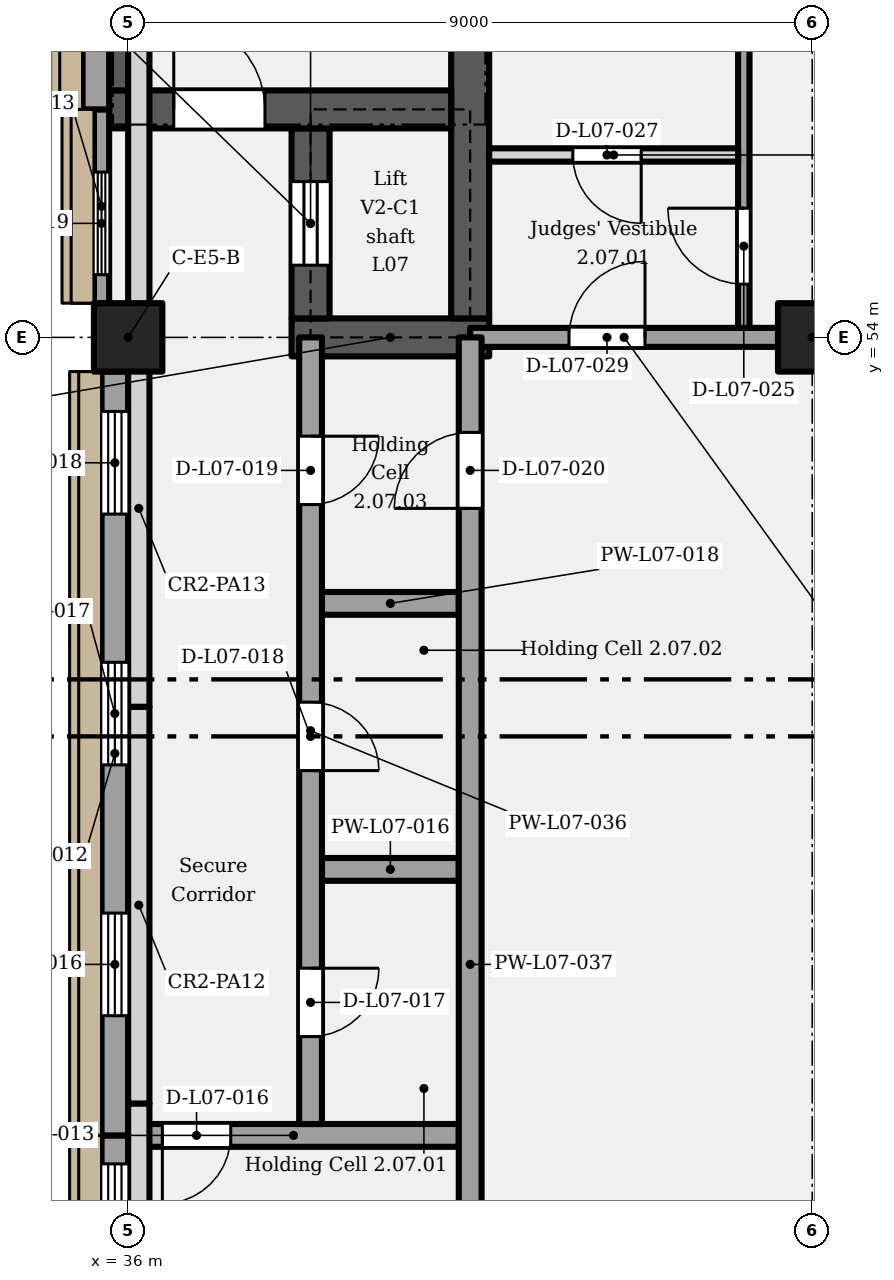
"""IFC4 building model, lengths in metres.
Left out: names, types, materials, properties, quantities, classifications, styles, units other than length and angle.
Written with IfcOpenShell. Run it as: python <this file> out.ifc"""

import sys

from ifc_helpers import new_model, si_unit, direction, frame, frame_2d, origin, origin_2d, place, context, subcontext, project, spatial, rectangle, extrude, element, fill, save


model = new_model("IFC4")
c1 = context("Model", 3, precision=1e-05, world=origin(), true_north=direction((0.0, 1.0)))
c2 = subcontext(c1, "Body", "Model", "MODEL_VIEW")
j1 = project(units=[si_unit("LENGTHUNIT", "METRE"), si_unit("PLANEANGLEUNIT", "RADIAN")], contexts=[c1])
p1 = place(None, origin())
s1 = spatial("IfcSite", under=j1, at=p1, CompositionType="ELEMENT")
p2 = place(p1, origin())
s2 = spatial("IfcBuilding", under=s1, at=p2, CompositionType="ELEMENT")
p3 = place(p2, frame((0.0, 0.0, 39.0)))
s3 = spatial("IfcBuildingStorey", under=s2, at=p3, CompositionType="ELEMENT", Elevation=39.0)
for number, where, z_axis, x_axis in (
    (1, (36.0, 54.0, 0.0), (0.0, 0.0, 1.0), (1.0, 0.0, 0.0)),
    (2, (45.0, 54.0, 0.0), (0.0, 0.0, 1.0), (1.0, 0.0, 0.0)),
):
    element("IfcColumn", number, at=place(p3, frame(where, z_axis=z_axis, x_axis=x_axis)), inside=s3, PredefinedType="COLUMN", context=c2, shape_type="SweptSolid", body=[
        extrude(rectangle(XDim=0.9, YDim=0.9, at=origin_2d()), origin(), (0.0, 0.0, 1.0), 5.4),
    ])
p4 = place(p3, frame((38.15, 54.0, 0.0), z_axis=(0.0, 0.0, 1.0), x_axis=(1.0, 0.0, 0.0)))
e3 = element("IfcWall", 3, at=p4, inside=s3, PredefinedType="SHEAR", context=c2, shape_type="SweptSolid", body=[
    extrude(rectangle(XDim=2.6, YDim=0.5, at=frame_2d((1.3, 0.0))), origin(), (0.0, 0.0, 1.0), 5.15),
])
p5 = place(p3, frame((38.4, 54.25, 0.0), z_axis=(0.0, 0.0, 1.0), x_axis=(0.0, 1.0, 0.0)))
e4 = element("IfcWall", 4, at=p5, inside=s3, PredefinedType="SHEAR", context=c2, shape_type="SweptSolid", body=[
    extrude(rectangle(XDim=2.5, YDim=0.5, at=frame_2d((1.25, 0.0))), origin(), (0.0, 0.0, 1.0), 5.15),
])
p6 = place(p5, frame((0.7, 0.0, 0.0)))
e5 = element("IfcOpeningElement", 5, at=p6, cuts=e4, PredefinedType="OPENING", context=c2, shape_type="SweptSolid", body=[
    extrude(rectangle(XDim=1.1, YDim=2.1, at=frame_2d((0.55, 1.05))), frame((0.0, 0.26, 0.0), z_axis=(0.0, -1.0, 0.0), x_axis=(1.0, 0.0, 0.0)), (0.0, 0.0, 1.0), 0.52),
])
p7 = place(p3, frame((40.5, 54.25, 0.0), z_axis=(0.0, 0.0, 1.0), x_axis=(0.0, 1.0, 0.0)))
e6 = element("IfcWall", 6, at=p7, inside=s3, PredefinedType="SHEAR", context=c2, shape_type="SweptSolid", body=[
    extrude(rectangle(XDim=11.5, YDim=0.5, at=frame_2d((5.75, 0.0))), origin(), (0.0, 0.0, 1.0), 5.15),
])
p8 = place(p3, frame((35.75, 57.0, 0.0), z_axis=(0.0, 0.0, 1.0), x_axis=(1.0, 0.0, 0.0)))
e7 = element("IfcWall", 7, at=p8, inside=s3, PredefinedType="SHEAR", context=c2, shape_type="SweptSolid", body=[
    extrude(rectangle(XDim=4.5, YDim=0.5, at=frame_2d((2.25, 0.0))), origin(), (0.0, 0.0, 1.0), 5.15),
])
p9 = place(p8, frame((0.85, 0.0, 0.0)))
e8 = element("IfcOpeningElement", 8, at=p9, cuts=e7, PredefinedType="OPENING", context=c2, shape_type="SweptSolid", body=[
    extrude(rectangle(XDim=1.2, YDim=2.1, at=frame_2d((0.6, 1.05))), frame((0.0, 0.26, 0.0), z_axis=(0.0, -1.0, 0.0), x_axis=(1.0, 0.0, 0.0)), (0.0, 0.0, 1.0), 0.52),
])
p10 = place(p3, frame((36.0, 57.25, 0.0), z_axis=(0.0, 0.0, 1.0), x_axis=(0.0, 1.0, 0.0)))
e9 = element("IfcWall", 9, at=p10, inside=s3, PredefinedType="SHEAR", context=c2, shape_type="SweptSolid", body=[
    extrude(rectangle(XDim=8.3, YDim=0.5, at=frame_2d((4.15, 0.0))), origin(), (0.0, 0.0, 1.0), 5.15),
])
p11 = place(p3, frame((35.825, 37.95, 0.0), z_axis=(0.0, 0.0, 1.0), x_axis=(0.0, 1.0, 0.0)))
e10 = element("IfcWall", 10, at=p11, inside=s3, PredefinedType="SOLIDWALL", context=c2, shape_type="SweptSolid", body=[
    extrude(rectangle(XDim=5.55, YDim=0.35, at=frame_2d((2.775, 0.0))), origin(), (0.0, 0.0, 1.0), 5.15),
])
p12 = place(p11, frame((0.525, 0.0, 1.2)))
e11 = element("IfcOpeningElement", 11, at=p12, cuts=e10, PredefinedType="OPENING", context=c2, shape_type="SweptSolid", body=[
    extrude(rectangle(XDim=1.35, YDim=3.0, at=frame_2d((0.675, 1.5))), frame((0.0, 0.185, 0.0), z_axis=(0.0, -1.0, 0.0), x_axis=(1.0, 0.0, 0.0)), (0.0, 0.0, 1.0), 0.37),
])
p13 = place(p11, frame((3.825, 0.0, 1.2)))
e12 = element("IfcOpeningElement", 12, at=p13, cuts=e10, PredefinedType="OPENING", context=c2, shape_type="SweptSolid", body=[
    extrude(rectangle(XDim=1.35, YDim=3.0, at=frame_2d((0.675, 1.5))), frame((0.0, 0.185, 0.0), z_axis=(0.0, -1.0, 0.0), x_axis=(1.0, 0.0, 0.0)), (0.0, 0.0, 1.0), 0.37),
])
p14 = place(p3, frame((35.825, 43.5, 0.0), z_axis=(0.0, 0.0, 1.0), x_axis=(0.0, 1.0, 0.0)))
e13 = element("IfcWall", 13, at=p14, inside=s3, PredefinedType="SOLIDWALL", context=c2, shape_type="SweptSolid", body=[
    extrude(rectangle(XDim=10.05, YDim=0.35, at=frame_2d((5.025, 0.0))), origin(), (0.0, 0.0, 1.0), 5.15),
])
p15 = place(p14, frame((1.575, 0.0, 1.2)))
e14 = element("IfcOpeningElement", 14, at=p15, cuts=e13, PredefinedType="OPENING", context=c2, shape_type="SweptSolid", body=[
    extrude(rectangle(XDim=1.35, YDim=3.0, at=frame_2d((0.675, 1.5))), frame((0.0, 0.185, 0.0), z_axis=(0.0, -1.0, 0.0), x_axis=(1.0, 0.0, 0.0)), (0.0, 0.0, 1.0), 0.37),
])
p16 = place(p14, frame((4.875, 0.0, 1.2)))
e15 = element("IfcOpeningElement", 15, at=p16, cuts=e13, PredefinedType="OPENING", context=c2, shape_type="SweptSolid", body=[
    extrude(rectangle(XDim=1.35, YDim=3.0, at=frame_2d((0.675, 1.5))), frame((0.0, 0.185, 0.0), z_axis=(0.0, -1.0, 0.0), x_axis=(1.0, 0.0, 0.0)), (0.0, 0.0, 1.0), 0.37),
])
p17 = place(p14, frame((8.175, 0.0, 1.2)))
e16 = element("IfcOpeningElement", 16, at=p17, cuts=e13, PredefinedType="OPENING", context=c2, shape_type="SweptSolid", body=[
    extrude(rectangle(XDim=1.35, YDim=3.0, at=frame_2d((0.675, 1.5))), frame((0.0, 0.185, 0.0), z_axis=(0.0, -1.0, 0.0), x_axis=(1.0, 0.0, 0.0)), (0.0, 0.0, 1.0), 0.37),
])
p18 = place(p3, frame((35.65, 54.45, 0.0), z_axis=(0.0, 0.0, 1.0), x_axis=(0.0, 1.0, 0.0)))
e17 = element("IfcWall", 17, at=p18, inside=s3, PredefinedType="SOLIDWALL", context=c2, shape_type="SweptSolid", body=[
    extrude(rectangle(XDim=2.55, YDim=0.2, at=frame_2d((1.275, 0.0))), origin(), (0.0, 0.0, 1.0), 5.15),
])
p19 = place(p18, frame((0.375, 0.0, 1.2)))
e18 = element("IfcOpeningElement", 18, at=p19, cuts=e17, PredefinedType="OPENING", context=c2, shape_type="SweptSolid", body=[
    extrude(rectangle(XDim=1.35, YDim=3.0, at=frame_2d((0.675, 1.5))), frame((0.0, 0.11, 0.0), z_axis=(0.0, -1.0, 0.0), x_axis=(1.0, 0.0, 0.0)), (0.0, 0.0, 1.0), 0.22),
])
p20 = place(p3, frame((35.575, 57.0, 0.0), z_axis=(0.0, 0.0, 1.0), x_axis=(0.0, 1.0, 0.0)))
e19 = element("IfcWall", 19, at=p20, inside=s3, PredefinedType="SOLIDWALL", context=c2, shape_type="SweptSolid", body=[
    extrude(rectangle(XDim=8.55, YDim=0.35, at=frame_2d((4.275, 0.0))), origin(), (0.0, 0.0, 1.0), 5.15),
])
p21 = place(p3, frame((36.14, 38.7, 5.4), z_axis=(0.0, 0.0, 1.0), x_axis=(0.0, 1.0, 0.0)))
e20 = element("IfcWall", 20, at=p21, inside=s3, PredefinedType="PARAPET", context=c2, shape_type="SweptSolid", body=[
    extrude(rectangle(XDim=5.22, YDim=0.28, at=frame_2d((2.61, 0.0))), origin(), (0.0, 0.0, 1.0), 1.2),
])
p22 = place(p3, frame((36.14, 43.92, 5.4), z_axis=(0.0, 0.0, 1.0), x_axis=(0.0, 1.0, 0.0)))
e21 = element("IfcWall", 21, at=p22, inside=s3, PredefinedType="PARAPET", context=c2, shape_type="SweptSolid", body=[
    extrude(rectangle(XDim=5.22, YDim=0.28, at=frame_2d((2.61, 0.0))), origin(), (0.0, 0.0, 1.0), 1.4),
])
p23 = place(p3, frame((36.14, 49.14, 5.4), z_axis=(0.0, 0.0, 1.0), x_axis=(0.0, 1.0, 0.0)))
e22 = element("IfcWall", 22, at=p23, inside=s3, PredefinedType="PARAPET", context=c2, shape_type="SweptSolid", body=[
    extrude(rectangle(XDim=5.22, YDim=0.28, at=frame_2d((2.61, 0.0))), origin(), (0.0, 0.0, 1.0), 1.6),
])
p24 = place(p3, frame((36.14, 54.36, 5.4), z_axis=(0.0, 0.0, 1.0), x_axis=(0.0, 1.0, 0.0)))
e23 = element("IfcWall", 23, at=p24, inside=s3, PredefinedType="PARAPET", context=c2, shape_type="SweptSolid", body=[
    extrude(rectangle(XDim=5.22, YDim=0.28, at=frame_2d((2.61, 0.0))), origin(), (0.0, 0.0, 1.0), 1.4),
])
p25 = place(p3, frame((36.0, 43.5, 0.0), z_axis=(0.0, 0.0, 1.0), x_axis=(1.0, 0.0, 0.0)))
e24 = element("IfcWall", 24, at=p25, inside=s3, PredefinedType="PARTITIONING", context=c2, shape_type="SweptSolid", body=[
    extrude(rectangle(XDim=4.35, YDim=0.3, at=frame_2d((2.175, 0.0))), origin(), (0.0, 0.0, 1.0), 5.15),
])
p26 = place(p25, frame((1.35, 0.0, 0.0), z_axis=(0.0, 0.0, 1.0), x_axis=(-1.0, 0.0, 0.0)))
e25 = element("IfcOpeningElement", 25, at=p26, cuts=e24, PredefinedType="OPENING", context=c2, shape_type="SweptSolid", body=[
    extrude(rectangle(XDim=0.9, YDim=2.1, at=frame_2d((0.45, 1.05))), frame((0.0, 0.16, 0.0), z_axis=(0.0, -1.0, 0.0), x_axis=(1.0, 0.0, 0.0)), (0.0, 0.0, 1.0), 0.32),
])
for number, where, z_axis, x_axis in (
    (26, (38.55, 47.0, 0.0), (0.0, 0.0, 1.0), (1.0, 0.0, 0.0)),
    (27, (38.55, 50.5, 0.0), (0.0, 0.0, 1.0), (1.0, 0.0, 0.0)),
):
    element("IfcWall", number, at=place(p3, frame(where, z_axis=z_axis, x_axis=x_axis)), inside=s3, PredefinedType="PARTITIONING", context=c2, shape_type="SweptSolid", body=[
        extrude(rectangle(XDim=1.8, YDim=0.3, at=frame_2d((0.9, 0.0))), origin(), (0.0, 0.0, 1.0), 5.15),
    ])
p27 = place(p3, frame((40.5, 54.0, 0.0), z_axis=(0.0, 0.0, 1.0), x_axis=(1.0, 0.0, 0.0)))
e28 = element("IfcWall", 28, at=p27, inside=s3, PredefinedType="PARTITIONING", context=c2, shape_type="SweptSolid", body=[
    extrude(rectangle(XDim=4.05, YDim=0.25, at=frame_2d((2.025, 0.0))), origin(), (0.0, 0.0, 1.0), 4.4),
])
p28 = place(p27, frame((1.3, 0.0, 0.0)))
e29 = element("IfcOpeningElement", 29, at=p28, cuts=e28, PredefinedType="OPENING", context=c2, shape_type="SweptSolid", body=[
    extrude(rectangle(XDim=1.0, YDim=2.1, at=frame_2d((0.5, 1.05))), frame((0.0, 0.135, 0.0), z_axis=(0.0, -1.0, 0.0), x_axis=(1.0, 0.0, 0.0)), (0.0, 0.0, 1.0), 0.27),
])
p29 = place(p3, frame((40.75, 56.4, 0.0), z_axis=(0.0, 0.0, 1.0), x_axis=(1.0, 0.0, 0.0)))
e30 = element("IfcWall", 30, at=p29, inside=s3, PredefinedType="PARTITIONING", context=c2, shape_type="SweptSolid", body=[
    extrude(rectangle(XDim=3.275, YDim=0.175, at=frame_2d((1.637, 0.0))), origin(), (0.0, 0.0, 1.0), 5.15),
])
p30 = place(p29, frame((2.0, 0.0, 0.0), z_axis=(0.0, 0.0, 1.0), x_axis=(-1.0, 0.0, 0.0)))
e31 = element("IfcOpeningElement", 31, at=p30, cuts=e30, PredefinedType="OPENING", context=c2, shape_type="SweptSolid", body=[
    extrude(rectangle(XDim=0.9, YDim=2.1, at=frame_2d((0.45, 1.05))), frame((0.0, 0.097, 0.0), z_axis=(0.0, -1.0, 0.0), x_axis=(1.0, 0.0, 0.0)), (0.0, 0.0, 1.0), 0.195),
])
p31 = place(p3, frame((38.4, 43.65, 0.0), z_axis=(0.0, 0.0, 1.0), x_axis=(0.0, 1.0, 0.0)))
e32 = element("IfcWall", 32, at=p31, inside=s3, PredefinedType="PARTITIONING", context=c2, shape_type="SweptSolid", body=[
    extrude(rectangle(XDim=10.35, YDim=0.3, at=frame_2d((5.175, 0.0))), origin(), (0.0, 0.0, 1.0), 5.15),
])
p32 = place(p31, frame((2.05, 0.0, 0.0), z_axis=(0.0, 0.0, 1.0), x_axis=(-1.0, 0.0, 0.0)))
e33 = element("IfcOpeningElement", 33, at=p32, cuts=e32, PredefinedType="OPENING", context=c2, shape_type="SweptSolid", body=[
    extrude(rectangle(XDim=0.9, YDim=2.0, at=frame_2d((0.45, 1.0))), frame((0.0, 0.16, 0.0), z_axis=(0.0, -1.0, 0.0), x_axis=(1.0, 0.0, 0.0)), (0.0, 0.0, 1.0), 0.32),
])
p33 = place(p31, frame((5.55, 0.0, 0.0), z_axis=(0.0, 0.0, 1.0), x_axis=(-1.0, 0.0, 0.0)))
e34 = element("IfcOpeningElement", 34, at=p33, cuts=e32, PredefinedType="OPENING", context=c2, shape_type="SweptSolid", body=[
    extrude(rectangle(XDim=0.9, YDim=2.0, at=frame_2d((0.45, 1.0))), frame((0.0, 0.16, 0.0), z_axis=(0.0, -1.0, 0.0), x_axis=(1.0, 0.0, 0.0)), (0.0, 0.0, 1.0), 0.32),
])
p34 = place(p31, frame((9.05, 0.0, 0.0), z_axis=(0.0, 0.0, 1.0), x_axis=(-1.0, 0.0, 0.0)))
e35 = element("IfcOpeningElement", 35, at=p34, cuts=e32, PredefinedType="OPENING", context=c2, shape_type="SweptSolid", body=[
    extrude(rectangle(XDim=0.9, YDim=2.0, at=frame_2d((0.45, 1.0))), frame((0.0, 0.16, 0.0), z_axis=(0.0, -1.0, 0.0), x_axis=(1.0, 0.0, 0.0)), (0.0, 0.0, 1.0), 0.32),
])
p35 = place(p3, frame((40.5, 37.5, 0.0), z_axis=(0.0, 0.0, 1.0), x_axis=(0.0, 1.0, 0.0)))
e36 = element("IfcWall", 36, at=p35, inside=s3, PredefinedType="PARTITIONING", context=c2, shape_type="SweptSolid", body=[
    extrude(rectangle(XDim=16.5, YDim=0.3, at=frame_2d((8.25, 0.0))), origin(), (0.0, 0.0, 1.0), 5.15),
])
p36 = place(p35, frame((14.25, 0.0, 0.0)))
e37 = element("IfcOpeningElement", 37, at=p36, cuts=e36, PredefinedType="OPENING", context=c2, shape_type="SweptSolid", body=[
    extrude(rectangle(XDim=1.0, YDim=2.0, at=frame_2d((0.5, 1.0))), frame((0.0, 0.16, 0.0), z_axis=(0.0, -1.0, 0.0), x_axis=(1.0, 0.0, 0.0)), (0.0, 0.0, 1.0), 0.32),
])
p37 = place(p3, frame((44.1, 54.125, 0.0), z_axis=(0.0, 0.0, 1.0), x_axis=(0.0, 1.0, 0.0)))
e38 = element("IfcWall", 38, at=p37, inside=s3, PredefinedType="PARTITIONING", context=c2, shape_type="SweptSolid", body=[
    extrude(rectangle(XDim=8.8, YDim=0.15, at=frame_2d((4.4, 0.0))), origin(), (0.0, 0.0, 1.0), 5.15),
])
p38 = place(p37, frame((0.575, 0.0, 0.0)))
e39 = element("IfcOpeningElement", 39, at=p38, cuts=e38, PredefinedType="OPENING", context=c2, shape_type="SweptSolid", body=[
    extrude(rectangle(XDim=1.0, YDim=2.1, at=frame_2d((0.5, 1.05))), frame((0.0, 0.085, 0.0), z_axis=(0.0, -1.0, 0.0), x_axis=(1.0, 0.0, 0.0)), (0.0, 0.0, 1.0), 0.17),
])
p39 = place(p37, frame((5.425, 0.0, 0.0)))
e40 = element("IfcOpeningElement", 40, at=p39, cuts=e38, PredefinedType="OPENING", context=c2, shape_type="SweptSolid", body=[
    extrude(rectangle(XDim=0.9, YDim=2.1, at=frame_2d((0.45, 1.05))), frame((0.0, 0.085, 0.0), z_axis=(0.0, -1.0, 0.0), x_axis=(1.0, 0.0, 0.0)), (0.0, 0.0, 1.0), 0.17),
])
p40 = place(p13, origin())
e41 = element("IfcWindow", 41, at=p40, inside=s3, PartitioningType="SINGLE_PANEL", PredefinedType="WINDOW", context=c2, shape_type="SweptSolid", body=[
    extrude(rectangle(XDim=1.35, YDim=3.0, at=frame_2d((0.675, 1.5))), frame((0.0, 0.03, 0.0), z_axis=(0.0, -1.0, 0.0), x_axis=(1.0, 0.0, 0.0)), (0.0, 0.0, 1.0), 0.06),
])
fill(e12, e41)
p41 = place(p15, origin())
e42 = element("IfcWindow", 42, at=p41, inside=s3, PartitioningType="SINGLE_PANEL", PredefinedType="WINDOW", context=c2, shape_type="SweptSolid", body=[
    extrude(rectangle(XDim=1.35, YDim=3.0, at=frame_2d((0.675, 1.5))), frame((0.0, 0.03, 0.0), z_axis=(0.0, -1.0, 0.0), x_axis=(1.0, 0.0, 0.0)), (0.0, 0.0, 1.0), 0.06),
])
fill(e14, e42)
p42 = place(p16, origin())
e43 = element("IfcWindow", 43, at=p42, inside=s3, PartitioningType="SINGLE_PANEL", PredefinedType="WINDOW", context=c2, shape_type="SweptSolid", body=[
    extrude(rectangle(XDim=1.35, YDim=3.0, at=frame_2d((0.675, 1.5))), frame((0.0, 0.03, 0.0), z_axis=(0.0, -1.0, 0.0), x_axis=(1.0, 0.0, 0.0)), (0.0, 0.0, 1.0), 0.06),
])
fill(e15, e43)
p43 = place(p17, origin())
e44 = element("IfcWindow", 44, at=p43, inside=s3, PartitioningType="SINGLE_PANEL", PredefinedType="WINDOW", context=c2, shape_type="SweptSolid", body=[
    extrude(rectangle(XDim=1.35, YDim=3.0, at=frame_2d((0.675, 1.5))), frame((0.0, 0.03, 0.0), z_axis=(0.0, -1.0, 0.0), x_axis=(1.0, 0.0, 0.0)), (0.0, 0.0, 1.0), 0.06),
])
fill(e16, e44)
p44 = place(p19, origin())
e45 = element("IfcWindow", 45, at=p44, inside=s3, PartitioningType="SINGLE_PANEL", PredefinedType="WINDOW", context=c2, shape_type="SweptSolid", body=[
    extrude(rectangle(XDim=1.35, YDim=3.0, at=frame_2d((0.675, 1.5))), frame((0.0, 0.03, 0.0), z_axis=(0.0, -1.0, 0.0), x_axis=(1.0, 0.0, 0.0)), (0.0, 0.0, 1.0), 0.06),
])
fill(e18, e45)
p45 = place(p6, origin())
e46 = element("IfcDoor", 46, at=p45, inside=s3, OperationType="SLIDING_TO_LEFT", PredefinedType="DOOR", context=c2, shape_type="SweptSolid", body=[
    extrude(rectangle(XDim=1.1, YDim=2.1, at=frame_2d((0.55, 1.05))), frame((0.0, 0.025, 0.0), z_axis=(0.0, -1.0, 0.0), x_axis=(1.0, 0.0, 0.0)), (0.0, 0.0, 1.0), 0.05),
])
fill(e5, e46)
p46 = place(p9, origin())
e47 = element("IfcDoor", 47, at=p46, inside=s3, OperationType="SINGLE_SWING_LEFT", PredefinedType="DOOR", context=c2, shape_type="SweptSolid", body=[
    extrude(rectangle(XDim=1.2, YDim=2.1, at=frame_2d((0.6, 1.05))), frame((0.0, 0.025, 0.0), z_axis=(0.0, -1.0, 0.0), x_axis=(1.0, 0.0, 0.0)), (0.0, 0.0, 1.0), 0.05),
])
fill(e8, e47)
p47 = place(p26, origin())
e48 = element("IfcDoor", 48, at=p47, inside=s3, OperationType="SINGLE_SWING_RIGHT", PredefinedType="DOOR", context=c2, shape_type="SweptSolid", body=[
    extrude(rectangle(XDim=0.9, YDim=2.1, at=frame_2d((0.45, 1.05))), frame((0.0, 0.025, 0.0), z_axis=(0.0, -1.0, 0.0), x_axis=(1.0, 0.0, 0.0)), (0.0, 0.0, 1.0), 0.05),
])
fill(e25, e48)
p48 = place(p32, origin())
e49 = element("IfcDoor", 49, at=p48, inside=s3, OperationType="SINGLE_SWING_LEFT", PredefinedType="DOOR", context=c2, shape_type="SweptSolid", body=[
    extrude(rectangle(XDim=0.9, YDim=2.0, at=frame_2d((0.45, 1.0))), frame((0.0, 0.025, 0.0), z_axis=(0.0, -1.0, 0.0), x_axis=(1.0, 0.0, 0.0)), (0.0, 0.0, 1.0), 0.05),
])
fill(e33, e49)
p49 = place(p33, origin())
e50 = element("IfcDoor", 50, at=p49, inside=s3, OperationType="SINGLE_SWING_RIGHT", PredefinedType="DOOR", context=c2, shape_type="SweptSolid", body=[
    extrude(rectangle(XDim=0.9, YDim=2.0, at=frame_2d((0.45, 1.0))), frame((0.0, 0.025, 0.0), z_axis=(0.0, -1.0, 0.0), x_axis=(1.0, 0.0, 0.0)), (0.0, 0.0, 1.0), 0.05),
])
fill(e34, e50)
p50 = place(p34, origin())
e51 = element("IfcDoor", 51, at=p50, inside=s3, OperationType="SINGLE_SWING_LEFT", PredefinedType="DOOR", context=c2, shape_type="SweptSolid", body=[
    extrude(rectangle(XDim=0.9, YDim=2.0, at=frame_2d((0.45, 1.0))), frame((0.0, 0.025, 0.0), z_axis=(0.0, -1.0, 0.0), x_axis=(1.0, 0.0, 0.0)), (0.0, 0.0, 1.0), 0.05),
])
fill(e35, e51)
p51 = place(p36, origin())
e52 = element("IfcDoor", 52, at=p51, inside=s3, OperationType="SINGLE_SWING_LEFT", PredefinedType="DOOR", context=c2, shape_type="SweptSolid", body=[
    extrude(rectangle(XDim=1.0, YDim=2.0, at=frame_2d((0.5, 1.0))), frame((0.0, 0.025, 0.0), z_axis=(0.0, -1.0, 0.0), x_axis=(1.0, 0.0, 0.0)), (0.0, 0.0, 1.0), 0.05),
])
fill(e37, e52)
p52 = place(p38, origin())
e53 = element("IfcDoor", 53, at=p52, inside=s3, OperationType="SINGLE_SWING_RIGHT", PredefinedType="DOOR", context=c2, shape_type="SweptSolid", body=[
    extrude(rectangle(XDim=1.0, YDim=2.1, at=frame_2d((0.5, 1.05))), frame((0.0, 0.025, 0.0), z_axis=(0.0, -1.0, 0.0), x_axis=(1.0, 0.0, 0.0)), (0.0, 0.0, 1.0), 0.05),
])
fill(e39, e53)
p53 = place(p30, origin())
e54 = element("IfcDoor", 54, at=p53, inside=s3, OperationType="SINGLE_SWING_LEFT", PredefinedType="DOOR", context=c2, shape_type="SweptSolid", body=[
    extrude(rectangle(XDim=0.9, YDim=2.1, at=frame_2d((0.45, 1.05))), frame((0.0, 0.025, 0.0), z_axis=(0.0, -1.0, 0.0), x_axis=(1.0, 0.0, 0.0)), (0.0, 0.0, 1.0), 0.05),
])
fill(e31, e54)
p54 = place(p28, origin())
e55 = element("IfcDoor", 55, at=p54, inside=s3, OperationType="SINGLE_SWING_RIGHT", PredefinedType="DOOR", context=c2, shape_type="SweptSolid", body=[
    extrude(rectangle(XDim=1.0, YDim=2.1, at=frame_2d((0.5, 1.05))), frame((0.0, 0.025, 0.0), z_axis=(0.0, -1.0, 0.0), x_axis=(1.0, 0.0, 0.0)), (0.0, 0.0, 1.0), 0.05),
])
fill(e29, e55)
save(model, sys.argv[1])
